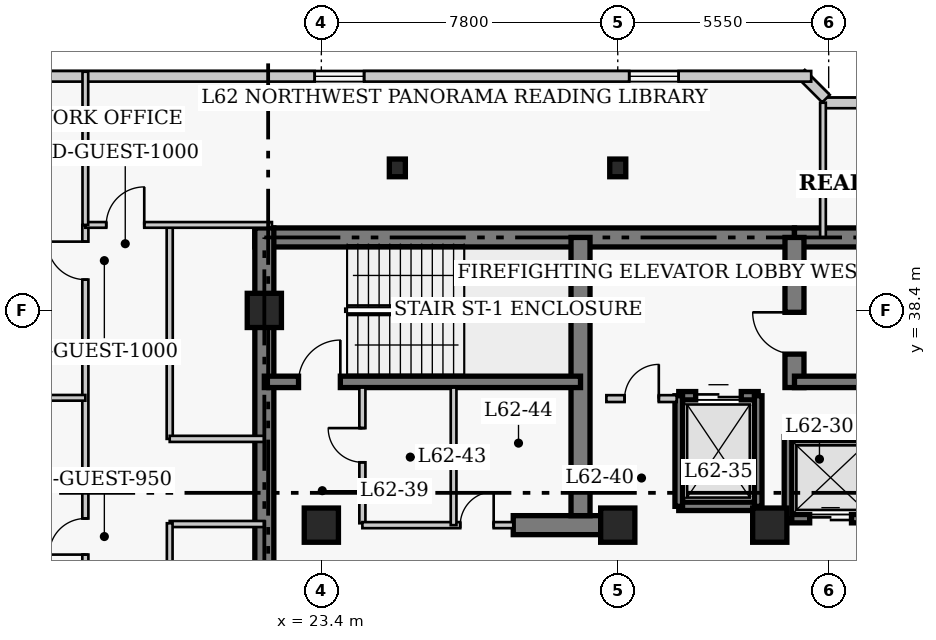
"""IFC4 building model, lengths in metres.
Left out: names, types, materials, properties, quantities, classifications, styles, units other than length and angle.
Written with IfcOpenShell. Run it as: python <this file> out.ifc"""

import sys

from ifc_helpers import new_model, si_unit, direction, frame, frame_2d, origin, origin_2d, place, context, subcontext, project, spatial, rectangle, i_section, extrude, element, fill, save


model = new_model("IFC4")
c1 = context("Model", 3, precision=1e-05, world=origin(), true_north=direction((0.0, 1.0)))
c2 = subcontext(c1, "Body", "Model", "MODEL_VIEW")
j1 = project(units=[si_unit("LENGTHUNIT", "METRE"), si_unit("PLANEANGLEUNIT", "RADIAN")], contexts=[c1])
p1 = place(None, origin())
s1 = spatial("IfcSite", under=j1, at=p1, CompositionType="ELEMENT")
p2 = place(p1, origin())
s2 = spatial("IfcBuilding", under=s1, at=p2, CompositionType="ELEMENT")
p3 = place(p2, frame((0.0, 0.0, 249.4)))
s3 = spatial("IfcBuildingStorey", under=s2, at=p3, CompositionType="ELEMENT", Elevation=249.4)
p4 = place(p3, frame((21.65, 40.32, 0.0), z_axis=(0.0, 0.0, 1.0), x_axis=(1.0, 0.0, 0.0)))
e1 = element("IfcWall", 1, at=p4, inside=s3, PredefinedType="SHEAR", context=c2, shape_type="SweptSolid", body=[
    extrude(rectangle(XDim=14.2, YDim=0.5, at=frame_2d((7.1, 0.0))), origin(), (0.0, 0.0, 1.0), 4.0),
])
p5 = place(p3, frame((35.85, 40.32, 0.0), z_axis=(0.0, 0.0, 1.0), x_axis=(1.0, 0.0, 0.0)))
e2 = element("IfcWall", 2, at=p5, inside=s3, PredefinedType="SHEAR", context=c2, shape_type="SweptSolid", body=[
    extrude(rectangle(XDim=12.6, YDim=0.5, at=frame_2d((6.3, 0.0))), origin(), (0.0, 0.0, 1.0), 4.0),
])
p6 = place(p3, frame((21.9, 27.05, 0.0), z_axis=(0.0, 0.0, 1.0), x_axis=(0.0, 1.0, 0.0)))
e3 = element("IfcWall", 3, at=p6, inside=s3, PredefinedType="SHEAR", context=c2, shape_type="SweptSolid", body=[
    extrude(rectangle(XDim=13.52, YDim=0.5, at=frame_2d((6.76, 0.0))), origin(), (0.0, 0.0, 1.0), 4.0),
])
p7 = place(p3, frame((28.45, 32.75, 0.0), z_axis=(0.0, 0.0, 1.0), x_axis=(1.0, 0.0, 0.0)))
e4 = element("IfcWall", 4, at=p7, inside=s3, PredefinedType="SHEAR", context=c2, shape_type="SweptSolid", body=[
    extrude(rectangle(XDim=2.4, YDim=0.5, at=frame_2d((1.2, 0.0))), origin(), (0.0, 0.0, 1.0), 4.0),
])
p8 = place(p3, frame((30.22, 33.0, 0.0), z_axis=(0.0, 0.0, 1.0), x_axis=(0.0, 1.0, 0.0)))
e5 = element("IfcWall", 5, at=p8, inside=s3, PredefinedType="SHEAR", context=c2, shape_type="SweptSolid", body=[
    extrude(rectangle(XDim=7.32, YDim=0.5, at=frame_2d((3.66, 0.0))), origin(), (0.0, 0.0, 1.0), 4.0),
])
p9 = place(p3, frame((35.85, 36.37, 0.0), z_axis=(0.0, 0.0, 1.0), x_axis=(0.0, 1.0, 0.0)))
e6 = element("IfcWall", 6, at=p9, inside=s3, PredefinedType="SHEAR", context=c2, shape_type="SweptSolid", body=[
    extrude(rectangle(XDim=3.95, YDim=0.5, at=frame_2d((1.975, 0.0))), origin(), (0.0, 0.0, 1.0), 4.0),
])
p10 = place(p9, frame((0.88, 0.0, 0.0)))
e7 = element("IfcOpeningElement", 7, at=p10, cuts=e6, PredefinedType="OPENING", context=c2, shape_type="SweptSolid", body=[
    extrude(rectangle(XDim=1.1, YDim=2.15, at=frame_2d((0.55, 1.075))), frame((0.0, 0.26, 0.0), z_axis=(0.0, -1.0, 0.0), x_axis=(1.0, 0.0, 0.0)), (0.0, 0.0, 1.0), 0.52),
])
p11 = place(p3, frame((21.9, 36.52, 0.0), z_axis=(0.0, 0.0, 1.0), x_axis=(1.0, 0.0, 0.0)))
e8 = element("IfcWall", 8, at=p11, inside=s3, PredefinedType="SHEAR", context=c2, shape_type="SweptSolid", body=[
    extrude(rectangle(XDim=8.32, YDim=0.3, at=frame_2d((4.16, 0.0))), origin(), (0.0, 0.0, 1.0), 4.0),
])
p12 = place(p11, frame((0.9, 0.0, 0.0)))
e9 = element("IfcOpeningElement", 9, at=p12, cuts=e8, PredefinedType="OPENING", context=c2, shape_type="SweptSolid", body=[
    extrude(rectangle(XDim=1.1, YDim=2.15, at=frame_2d((0.55, 1.075))), frame((0.0, 0.16, 0.0), z_axis=(0.0, -1.0, 0.0), x_axis=(1.0, 0.0, 0.0)), (0.0, 0.0, 1.0), 0.32),
])
p13 = place(p3, frame((35.85, 36.52, 0.0), z_axis=(0.0, 0.0, 1.0), x_axis=(1.0, 0.0, 0.0)))
e10 = element("IfcWall", 10, at=p13, inside=s3, PredefinedType="SHEAR", context=c2, shape_type="SweptSolid", body=[
    extrude(rectangle(XDim=8.33, YDim=0.3, at=frame_2d((4.165, 0.0))), origin(), (0.0, 0.0, 1.0), 4.0),
])
for number, where, z_axis, x_axis in (
    (11, (21.9, 38.4, 0.0), (0.0, 0.0, 1.0), (1.0, 0.0, 0.0)),
    (12, (23.4, 32.75, 0.0), (0.0, 0.0, 1.0), (1.0, 0.0, 0.0)),
    (13, (31.2, 32.75, 0.0), (0.0, 0.0, 1.0), (1.0, 0.0, 0.0)),
    (14, (35.2, 32.75, 0.0), (0.0, 0.0, 1.0), (1.0, 0.0, 0.0)),
):
    element("IfcColumn", number, at=place(p3, frame(where, z_axis=z_axis, x_axis=x_axis)), inside=s3, PredefinedType="COLUMN", context=c2, shape_type="SweptSolid", body=[
        extrude(rectangle(XDim=0.9, YDim=0.9, at=origin_2d()), origin(), (0.0, 0.0, 1.0), 4.0),
    ])
for number, where, z_axis, x_axis in (
    (15, (25.4, 42.15, 0.0), (0.0, 0.0, 1.0), (1.0, 0.0, 0.0)),
    (16, (31.2, 42.15, 0.0), (0.0, 0.0, 1.0), (1.0, 0.0, 0.0)),
):
    element("IfcColumn", number, at=place(p3, frame(where, z_axis=z_axis, x_axis=x_axis)), inside=s3, PredefinedType="COLUMN", context=c2, shape_type="SweptSolid", body=[
        extrude(i_section(OverallWidth=0.422, OverallDepth=0.465, WebThickness=0.045, FlangeThickness=0.073, FilletRadius=0.017, at=origin_2d()), origin(), (0.0, 0.0, 1.0), 4.0),
    ])
p14 = place(p3, frame((41.39, 43.86, 0.0), z_axis=(0.0, 0.0, 1.0), x_axis=(-1.0, 0.0, 0.0)))
e17 = element("IfcWall", 17, at=p14, inside=s3, PredefinedType="SOLIDWALL", context=c2, shape_type="SweptSolid", body=[
    extrude(rectangle(XDim=4.78, YDim=0.28, at=frame_2d((2.39, 0.0))), origin(), (0.0, 0.0, 1.0), 3.76),
])
p15 = place(p14, frame((1.74, 0.0, 0.85)))
e18 = element("IfcOpeningElement", 18, at=p15, cuts=e17, PredefinedType="OPENING", context=c2, shape_type="SweptSolid", body=[
    extrude(rectangle(XDim=1.3, YDim=1.7, at=frame_2d((0.65, 0.85))), frame((0.0, 0.15, 0.0), z_axis=(0.0, -1.0, 0.0), x_axis=(1.0, 0.0, 0.0)), (0.0, 0.0, 1.0), 0.3),
])
p16 = place(p3, frame((36.679, 43.973, 0.0), z_axis=(0.0, 0.0, 1.0), x_axis=(-0.706975312048, 0.707238225886, 0.0)))
e19 = element("IfcWall", 19, at=p16, inside=s3, PredefinedType="SOLIDWALL", context=c2, shape_type="SweptSolid", body=[
    extrude(rectangle(XDim=0.929, YDim=0.28, at=frame_2d((0.464, 0.0))), origin(), (0.0, 0.0, 1.0), 3.76),
])
p17 = place(p3, frame((36.29, 44.56, 0.0), z_axis=(0.0, 0.0, 1.0), x_axis=(-1.0, 0.0, 0.0)))
e20 = element("IfcWall", 20, at=p17, inside=s3, PredefinedType="SOLIDWALL", context=c2, shape_type="SweptSolid", body=[
    extrude(rectangle(XDim=24.83, YDim=0.28, at=frame_2d((12.415, 0.0))), origin(), (0.0, 0.0, 1.0), 3.76),
])
p18 = place(p17, frame((3.488, 0.0, 0.85)))
e21 = element("IfcOpeningElement", 21, at=p18, cuts=e20, PredefinedType="OPENING", context=c2, shape_type="SweptSolid", body=[
    extrude(rectangle(XDim=1.3, YDim=1.7, at=frame_2d((0.65, 0.85))), frame((0.0, 0.15, 0.0), z_axis=(0.0, -1.0, 0.0), x_axis=(1.0, 0.0, 0.0)), (0.0, 0.0, 1.0), 0.3),
])
p19 = place(p17, frame((11.765, 0.0, 0.85)))
e22 = element("IfcOpeningElement", 22, at=p19, cuts=e20, PredefinedType="OPENING", context=c2, shape_type="SweptSolid", body=[
    extrude(rectangle(XDim=1.3, YDim=1.7, at=frame_2d((0.65, 0.85))), frame((0.0, 0.15, 0.0), z_axis=(0.0, -1.0, 0.0), x_axis=(1.0, 0.0, 0.0)), (0.0, 0.0, 1.0), 0.3),
])
p20 = place(p17, frame((20.042, 0.0, 0.85)))
e23 = element("IfcOpeningElement", 23, at=p20, cuts=e20, PredefinedType="OPENING", context=c2, shape_type="SweptSolid", body=[
    extrude(rectangle(XDim=1.3, YDim=1.7, at=frame_2d((0.65, 0.85))), frame((0.0, 0.15, 0.0), z_axis=(0.0, -1.0, 0.0), x_axis=(1.0, 0.0, 0.0)), (0.0, 0.0, 1.0), 0.3),
])
p21 = place(p3, frame((35.68, 35.08, 0.0), z_axis=(0.0, 0.0, 1.0), x_axis=(1.0, 0.0, 0.0)))
e24 = element("IfcWall", 24, at=p21, inside=s3, PredefinedType="SHEAR", context=c2, shape_type="SweptSolid", body=[
    extrude(rectangle(XDim=2.32, YDim=0.22, at=frame_2d((1.16, 0.0))), origin(), (0.0, 0.0, 1.0), 4.0),
])
p22 = place(p3, frame((35.68, 32.92, 0.0), z_axis=(0.0, 0.0, 1.0), x_axis=(1.0, 0.0, 0.0)))
e25 = element("IfcWall", 25, at=p22, inside=s3, PredefinedType="SHEAR", context=c2, shape_type="SweptSolid", body=[
    extrude(rectangle(XDim=2.32, YDim=0.22, at=frame_2d((1.16, 0.0))), origin(), (0.0, 0.0, 1.0), 4.0),
])
p23 = place(p22, frame((0.57, 0.0, 0.0)))
e26 = element("IfcOpeningElement", 26, at=p23, cuts=e25, PredefinedType="OPENING", context=c2, shape_type="SweptSolid", body=[
    extrude(rectangle(XDim=1.1, YDim=2.15, at=frame_2d((0.55, 1.075))), frame((0.0, 0.12, 0.0), z_axis=(0.0, -1.0, 0.0), x_axis=(1.0, 0.0, 0.0)), (0.0, 0.0, 1.0), 0.24),
])
p24 = place(p3, frame((35.68, 32.92, 0.0), z_axis=(0.0, 0.0, 1.0), x_axis=(0.0, 1.0, 0.0)))
e27 = element("IfcWall", 27, at=p24, inside=s3, PredefinedType="SHEAR", context=c2, shape_type="SweptSolid", body=[
    extrude(rectangle(XDim=2.16, YDim=0.2, at=frame_2d((1.08, 0.0))), origin(), (0.0, 0.0, 1.0), 4.0),
])
p25 = place(p3, frame((32.805, 36.155, 0.0), z_axis=(0.0, 0.0, 1.0), x_axis=(1.0, 0.0, 0.0)))
e28 = element("IfcWall", 28, at=p25, inside=s3, PredefinedType="SHEAR", context=c2, shape_type="SweptSolid", body=[
    extrude(rectangle(XDim=2.09, YDim=0.22, at=frame_2d((1.045, 0.0))), origin(), (0.0, 0.0, 1.0), 4.0),
])
p26 = place(p25, frame((0.445, 0.0, 0.0)))
e29 = element("IfcOpeningElement", 29, at=p26, cuts=e28, PredefinedType="OPENING", context=c2, shape_type="SweptSolid", body=[
    extrude(rectangle(XDim=1.2, YDim=2.15, at=frame_2d((0.6, 1.075))), frame((0.0, 0.12, 0.0), z_axis=(0.0, -1.0, 0.0), x_axis=(1.0, 0.0, 0.0)), (0.0, 0.0, 1.0), 0.24),
])
p27 = place(p3, frame((32.805, 33.245, 0.0), z_axis=(0.0, 0.0, 1.0), x_axis=(1.0, 0.0, 0.0)))
e30 = element("IfcWall", 30, at=p27, inside=s3, PredefinedType="SHEAR", context=c2, shape_type="SweptSolid", body=[
    extrude(rectangle(XDim=2.09, YDim=0.22, at=frame_2d((1.045, 0.0))), origin(), (0.0, 0.0, 1.0), 4.0),
])
for number, where, z_axis, x_axis in (
    (31, (32.805, 33.245, 0.0), (0.0, 0.0, 1.0), (0.0, 1.0, 0.0)),
    (32, (34.895, 33.245, 0.0), (0.0, 0.0, 1.0), (0.0, 1.0, 0.0)),
):
    element("IfcWall", number, at=place(p3, frame(where, z_axis=z_axis, x_axis=x_axis)), inside=s3, PredefinedType="SHEAR", context=c2, shape_type="SweptSolid", body=[
        extrude(rectangle(XDim=2.91, YDim=0.2, at=frame_2d((1.455, 0.0))), origin(), (0.0, 0.0, 1.0), 4.0),
    ])
p28 = place(p3, frame((30.9, 36.08, 0.0), z_axis=(0.0, 0.0, 1.0), x_axis=(1.0, 0.0, 0.0)))
e33 = element("IfcWall", 33, at=p28, inside=s3, PredefinedType="PARTITIONING", context=c2, shape_type="SweptSolid", body=[
    extrude(rectangle(XDim=1.85, YDim=0.18, at=frame_2d((0.925, 0.0))), origin(), (0.0, 0.0, 1.0), 3.76),
])
p29 = place(p28, frame((0.48, 0.0, 0.0)))
e34 = element("IfcOpeningElement", 34, at=p29, cuts=e33, PredefinedType="OPENING", context=c2, shape_type="SweptSolid", body=[
    extrude(rectangle(XDim=0.9, YDim=2.15, at=frame_2d((0.45, 1.075))), frame((0.0, 0.1, 0.0), z_axis=(0.0, -1.0, 0.0), x_axis=(1.0, 0.0, 0.0)), (0.0, 0.0, 1.0), 0.2),
])
p30 = place(p3, frame((24.48, 32.8, 0.0), z_axis=(0.0, 0.0, 1.0), x_axis=(0.0, 1.0, 0.0)))
e35 = element("IfcWall", 35, at=p30, inside=s3, PredefinedType="PARTITIONING", context=c2, shape_type="SweptSolid", body=[
    extrude(rectangle(XDim=3.57, YDim=0.16, at=frame_2d((1.785, 0.0))), origin(), (0.0, 0.0, 1.0), 3.76),
])
p31 = place(p30, frame((1.604, 0.0, 0.0)))
e36 = element("IfcOpeningElement", 36, at=p31, cuts=e35, PredefinedType="OPENING", context=c2, shape_type="SweptSolid", body=[
    extrude(rectangle(XDim=0.9, YDim=2.1, at=frame_2d((0.45, 1.05))), frame((0.0, 0.09, 0.0), z_axis=(0.0, -1.0, 0.0), x_axis=(1.0, 0.0, 0.0)), (0.0, 0.0, 1.0), 0.18),
])
p32 = place(p3, frame((24.48, 32.75, 0.0), z_axis=(0.0, 0.0, 1.0), x_axis=(1.0, 0.0, 0.0)))
e37 = element("IfcWall", 37, at=p32, inside=s3, PredefinedType="PARTITIONING", context=c2, shape_type="SweptSolid", body=[
    extrude(rectangle(XDim=3.97, YDim=0.16, at=frame_2d((1.985, 0.0))), origin(), (0.0, 0.0, 1.0), 3.76),
])
p33 = place(p32, frame((2.575, 0.0, 0.0)))
e38 = element("IfcOpeningElement", 38, at=p33, cuts=e37, PredefinedType="OPENING", context=c2, shape_type="SweptSolid", body=[
    extrude(rectangle(XDim=0.88, YDim=2.05, at=frame_2d((0.44, 1.025))), frame((0.0, 0.09, 0.0), z_axis=(0.0, -1.0, 0.0), x_axis=(1.0, 0.0, 0.0)), (0.0, 0.0, 1.0), 0.18),
])
p34 = place(p3, frame((26.88, 32.75, 0.0), z_axis=(0.0, 0.0, 1.0), x_axis=(0.0, 1.0, 0.0)))
e39 = element("IfcWall", 39, at=p34, inside=s3, PredefinedType="PARTITIONING", context=c2, shape_type="SweptSolid", body=[
    extrude(rectangle(XDim=3.62, YDim=0.15, at=frame_2d((1.81, 0.0))), origin(), (0.0, 0.0, 1.0), 3.76),
])
p35 = place(p3, frame((17.19, 8.55, 0.0), z_axis=(0.0, 0.0, 1.0), x_axis=(0.0, 1.0, 0.0)))
e40 = element("IfcWall", 40, at=p35, inside=s3, PredefinedType="PARTITIONING", context=c2, shape_type="SweptSolid", body=[
    extrude(rectangle(XDim=32.1, YDim=0.16, at=frame_2d((16.05, 0.0))), origin(), (0.0, 0.0, 1.0), 3.76),
])
p36 = place(p35, frame((5.25, 0.0, 0.0)))
e41 = element("IfcOpeningElement", 41, at=p36, cuts=e40, PredefinedType="OPENING", context=c2, shape_type="SweptSolid", body=[
    extrude(rectangle(XDim=0.95, YDim=2.1, at=frame_2d((0.475, 1.05))), frame((0.0, 0.09, 0.0), z_axis=(0.0, -1.0, 0.0), x_axis=(1.0, 0.0, 0.0)), (0.0, 0.0, 1.0), 0.18),
])
p37 = place(p35, frame((15.375, 0.0, 0.0)))
e42 = element("IfcOpeningElement", 42, at=p37, cuts=e40, PredefinedType="OPENING", context=c2, shape_type="SweptSolid", body=[
    extrude(rectangle(XDim=0.95, YDim=2.1, at=frame_2d((0.475, 1.05))), frame((0.0, 0.09, 0.0), z_axis=(0.0, -1.0, 0.0), x_axis=(1.0, 0.0, 0.0)), (0.0, 0.0, 1.0), 0.18),
])
p38 = place(p35, frame((23.425, 0.0, 0.0)))
e43 = element("IfcOpeningElement", 43, at=p38, cuts=e40, PredefinedType="OPENING", context=c2, shape_type="SweptSolid", body=[
    extrude(rectangle(XDim=0.95, YDim=2.1, at=frame_2d((0.475, 1.05))), frame((0.0, 0.09, 0.0), z_axis=(0.0, -1.0, 0.0), x_axis=(1.0, 0.0, 0.0)), (0.0, 0.0, 1.0), 0.18),
])
p39 = place(p35, frame((30.66, 0.0, 0.0)))
e44 = element("IfcOpeningElement", 44, at=p39, cuts=e40, PredefinedType="OPENING", context=c2, shape_type="SweptSolid", body=[
    extrude(rectangle(XDim=1.0, YDim=2.15, at=frame_2d((0.5, 1.075))), frame((0.0, 0.09, 0.0), z_axis=(0.0, -1.0, 0.0), x_axis=(1.0, 0.0, 0.0)), (0.0, 0.0, 1.0), 0.18),
])
p40 = place(p3, frame((19.41, 35.02, 0.0), z_axis=(0.0, 0.0, 1.0), x_axis=(0.0, 1.0, 0.0)))
e45 = element("IfcWall", 45, at=p40, inside=s3, PredefinedType="PARTITIONING", context=c2, shape_type="SweptSolid", body=[
    extrude(rectangle(XDim=5.63, YDim=0.16, at=frame_2d((2.815, 0.0))), origin(), (0.0, 0.0, 1.0), 3.76),
])
for number, where, z_axis, x_axis in (
    (46, (19.41, 35.02, 0.0), (0.0, 0.0, 1.0), (1.0, 0.0, 0.0)),
    (47, (19.41, 32.78, 0.0), (0.0, 0.0, 1.0), (1.0, 0.0, 0.0)),
):
    element("IfcWall", number, at=place(p3, frame(where, z_axis=z_axis, x_axis=x_axis)), inside=s3, PredefinedType="PARTITIONING", context=c2, shape_type="SweptSolid", body=[
        extrude(rectangle(XDim=2.49, YDim=0.16, at=frame_2d((1.245, 0.0))), origin(), (0.0, 0.0, 1.0), 3.76),
    ])
p41 = place(p3, frame((17.19, 40.65, 0.0), z_axis=(0.0, 0.0, 1.0), x_axis=(1.0, 0.0, 0.0)))
e48 = element("IfcWall", 48, at=p41, inside=s3, PredefinedType="PARTITIONING", context=c2, shape_type="SweptSolid", body=[
    extrude(rectangle(XDim=4.91, YDim=0.15, at=frame_2d((2.455, 0.0))), origin(), (0.0, 0.0, 1.0), 3.76),
])
p42 = place(p41, frame((0.55, 0.0, 0.0)))
e49 = element("IfcOpeningElement", 49, at=p42, cuts=e48, PredefinedType="OPENING", context=c2, shape_type="SweptSolid", body=[
    extrude(rectangle(XDim=1.0, YDim=2.15, at=frame_2d((0.5, 1.075))), frame((0.0, 0.085, 0.0), z_axis=(0.0, -1.0, 0.0), x_axis=(1.0, 0.0, 0.0)), (0.0, 0.0, 1.0), 0.17),
])
p43 = place(p3, frame((19.41, 27.26, 0.0), z_axis=(0.0, 0.0, 1.0), x_axis=(0.0, 1.0, 0.0)))
e50 = element("IfcWall", 50, at=p43, inside=s3, PredefinedType="PARTITIONING", context=c2, shape_type="SweptSolid", body=[
    extrude(rectangle(XDim=5.54, YDim=0.15, at=frame_2d((2.77, 0.0))), origin(), (0.0, 0.0, 1.0), 3.76),
])
p44 = place(p3, frame((17.19, 40.65, 0.0), z_axis=(0.0, 0.0, 1.0), x_axis=(0.0, 1.0, 0.0)))
e51 = element("IfcWall", 51, at=p44, inside=s3, PredefinedType="PARTITIONING", context=c2, shape_type="SweptSolid", body=[
    extrude(rectangle(XDim=4.03, YDim=0.15, at=frame_2d((2.015, 0.0))), origin(), (0.0, 0.0, 1.0), 3.76),
])
p45 = place(p3, frame((36.6, 40.32, 0.0), z_axis=(0.0, 0.0, 1.0), x_axis=(0.0, 1.0, 0.0)))
e52 = element("IfcWall", 52, at=p45, inside=s3, PredefinedType="PARTITIONING", context=c2, shape_type="SweptSolid", body=[
    extrude(rectangle(XDim=3.545, YDim=0.15, at=frame_2d((1.772, 0.0))), origin(), (0.0, 0.0, 1.0), 3.76),
])
p46 = place(p3, frame((14.45, 36.1, 0.0), z_axis=(0.0, 0.0, 1.0), x_axis=(1.0, 0.0, 0.0)))
e53 = element("IfcWall", 53, at=p46, inside=s3, PredefinedType="PARTITIONING", context=c2, shape_type="SweptSolid", body=[
    extrude(rectangle(XDim=2.74, YDim=0.15, at=frame_2d((1.37, 0.0))), origin(), (0.0, 0.0, 1.0), 3.76),
])
p47 = place(p18, origin())
e54 = element("IfcWindow", 54, at=p47, inside=s3, PartitioningType="SINGLE_PANEL", PredefinedType="WINDOW", context=c2, shape_type="SweptSolid", body=[
    extrude(rectangle(XDim=1.3, YDim=1.7, at=frame_2d((0.65, 0.85))), frame((0.0, 0.03, 0.0), z_axis=(0.0, -1.0, 0.0), x_axis=(1.0, 0.0, 0.0)), (0.0, 0.0, 1.0), 0.06),
])
fill(e21, e54)
p48 = place(p19, origin())
e55 = element("IfcWindow", 55, at=p48, inside=s3, PartitioningType="SINGLE_PANEL", PredefinedType="WINDOW", context=c2, shape_type="SweptSolid", body=[
    extrude(rectangle(XDim=1.3, YDim=1.7, at=frame_2d((0.65, 0.85))), frame((0.0, 0.03, 0.0), z_axis=(0.0, -1.0, 0.0), x_axis=(1.0, 0.0, 0.0)), (0.0, 0.0, 1.0), 0.06),
])
fill(e22, e55)
p49 = place(p23, origin())
e56 = element("IfcDoor", 56, at=p49, inside=s3, OperationType="DOUBLE_DOOR_SLIDING", PredefinedType="DOOR", context=c2, shape_type="SweptSolid", body=[
    extrude(rectangle(XDim=1.1, YDim=2.15, at=frame_2d((0.55, 1.075))), frame((0.0, 0.025, 0.0), z_axis=(0.0, -1.0, 0.0), x_axis=(1.0, 0.0, 0.0)), (0.0, 0.0, 1.0), 0.05),
])
fill(e26, e56)
p50 = place(p26, origin())
e57 = element("IfcDoor", 57, at=p50, inside=s3, OperationType="DOUBLE_DOOR_SLIDING", PredefinedType="DOOR", context=c2, shape_type="SweptSolid", body=[
    extrude(rectangle(XDim=1.2, YDim=2.15, at=frame_2d((0.6, 1.075))), frame((0.0, 0.025, 0.0), z_axis=(0.0, -1.0, 0.0), x_axis=(1.0, 0.0, 0.0)), (0.0, 0.0, 1.0), 0.05),
])
fill(e29, e57)
p51 = place(p29, origin())
e58 = element("IfcDoor", 58, at=p51, inside=s3, OperationType="SINGLE_SWING_RIGHT", PredefinedType="DOOR", context=c2, shape_type="SweptSolid", body=[
    extrude(rectangle(XDim=0.9, YDim=2.15, at=frame_2d((0.45, 1.075))), frame((0.0, 0.025, 0.0), z_axis=(0.0, -1.0, 0.0), x_axis=(1.0, 0.0, 0.0)), (0.0, 0.0, 1.0), 0.05),
])
fill(e34, e58)
p52 = place(p31, origin())
e59 = element("IfcDoor", 59, at=p52, inside=s3, OperationType="SINGLE_SWING_RIGHT", PredefinedType="DOOR", context=c2, shape_type="SweptSolid", body=[
    extrude(rectangle(XDim=0.9, YDim=2.1, at=frame_2d((0.45, 1.05))), frame((0.0, 0.025, 0.0), z_axis=(0.0, -1.0, 0.0), x_axis=(1.0, 0.0, 0.0)), (0.0, 0.0, 1.0), 0.05),
])
fill(e36, e59)
p53 = place(p33, origin())
e60 = element("IfcDoor", 60, at=p53, inside=s3, OperationType="SINGLE_SWING_RIGHT", PredefinedType="DOOR", context=c2, shape_type="SweptSolid", body=[
    extrude(rectangle(XDim=0.88, YDim=2.05, at=frame_2d((0.44, 1.025))), frame((0.0, 0.025, 0.0), z_axis=(0.0, -1.0, 0.0), x_axis=(1.0, 0.0, 0.0)), (0.0, 0.0, 1.0), 0.05),
])
fill(e38, e60)
p54 = place(p42, origin())
e61 = element("IfcDoor", 61, at=p54, inside=s3, OperationType="SINGLE_SWING_RIGHT", PredefinedType="DOOR", context=c2, shape_type="SweptSolid", body=[
    extrude(rectangle(XDim=1.0, YDim=2.15, at=frame_2d((0.5, 1.075))), frame((0.0, 0.025, 0.0), z_axis=(0.0, -1.0, 0.0), x_axis=(1.0, 0.0, 0.0)), (0.0, 0.0, 1.0), 0.05),
])
fill(e49, e61)
p55 = place(p38, origin())
e62 = element("IfcDoor", 62, at=p55, inside=s3, OperationType="SINGLE_SWING_LEFT", PredefinedType="DOOR", context=c2, shape_type="SweptSolid", body=[
    extrude(rectangle(XDim=0.95, YDim=2.1, at=frame_2d((0.475, 1.05))), frame((0.0, 0.025, 0.0), z_axis=(0.0, -1.0, 0.0), x_axis=(1.0, 0.0, 0.0)), (0.0, 0.0, 1.0), 0.05),
])
fill(e43, e62)
p56 = place(p39, origin())
e63 = element("IfcDoor", 63, at=p56, inside=s3, OperationType="SINGLE_SWING_RIGHT", PredefinedType="DOOR", context=c2, shape_type="SweptSolid", body=[
    extrude(rectangle(XDim=1.0, YDim=2.15, at=frame_2d((0.5, 1.075))), frame((0.0, 0.025, 0.0), z_axis=(0.0, -1.0, 0.0), x_axis=(1.0, 0.0, 0.0)), (0.0, 0.0, 1.0), 0.05),
])
fill(e44, e63)
p57 = place(p12, origin())
e64 = element("IfcDoor", 64, at=p57, inside=s3, OperationType="SINGLE_SWING_RIGHT", PredefinedType="DOOR", context=c2, shape_type="SweptSolid", body=[
    extrude(rectangle(XDim=1.1, YDim=2.15, at=frame_2d((0.55, 1.075))), frame((0.0, 0.025, 0.0), z_axis=(0.0, -1.0, 0.0), x_axis=(1.0, 0.0, 0.0)), (0.0, 0.0, 1.0), 0.05),
])
fill(e9, e64)
p58 = place(p10, origin())
e65 = element("IfcDoor", 65, at=p58, inside=s3, OperationType="SINGLE_SWING_RIGHT", PredefinedType="DOOR", context=c2, shape_type="SweptSolid", body=[
    extrude(rectangle(XDim=1.1, YDim=2.15, at=frame_2d((0.55, 1.075))), frame((0.0, 0.025, 0.0), z_axis=(0.0, -1.0, 0.0), x_axis=(1.0, 0.0, 0.0)), (0.0, 0.0, 1.0), 0.05),
])
fill(e7, e65)
save(model, sys.argv[1])
